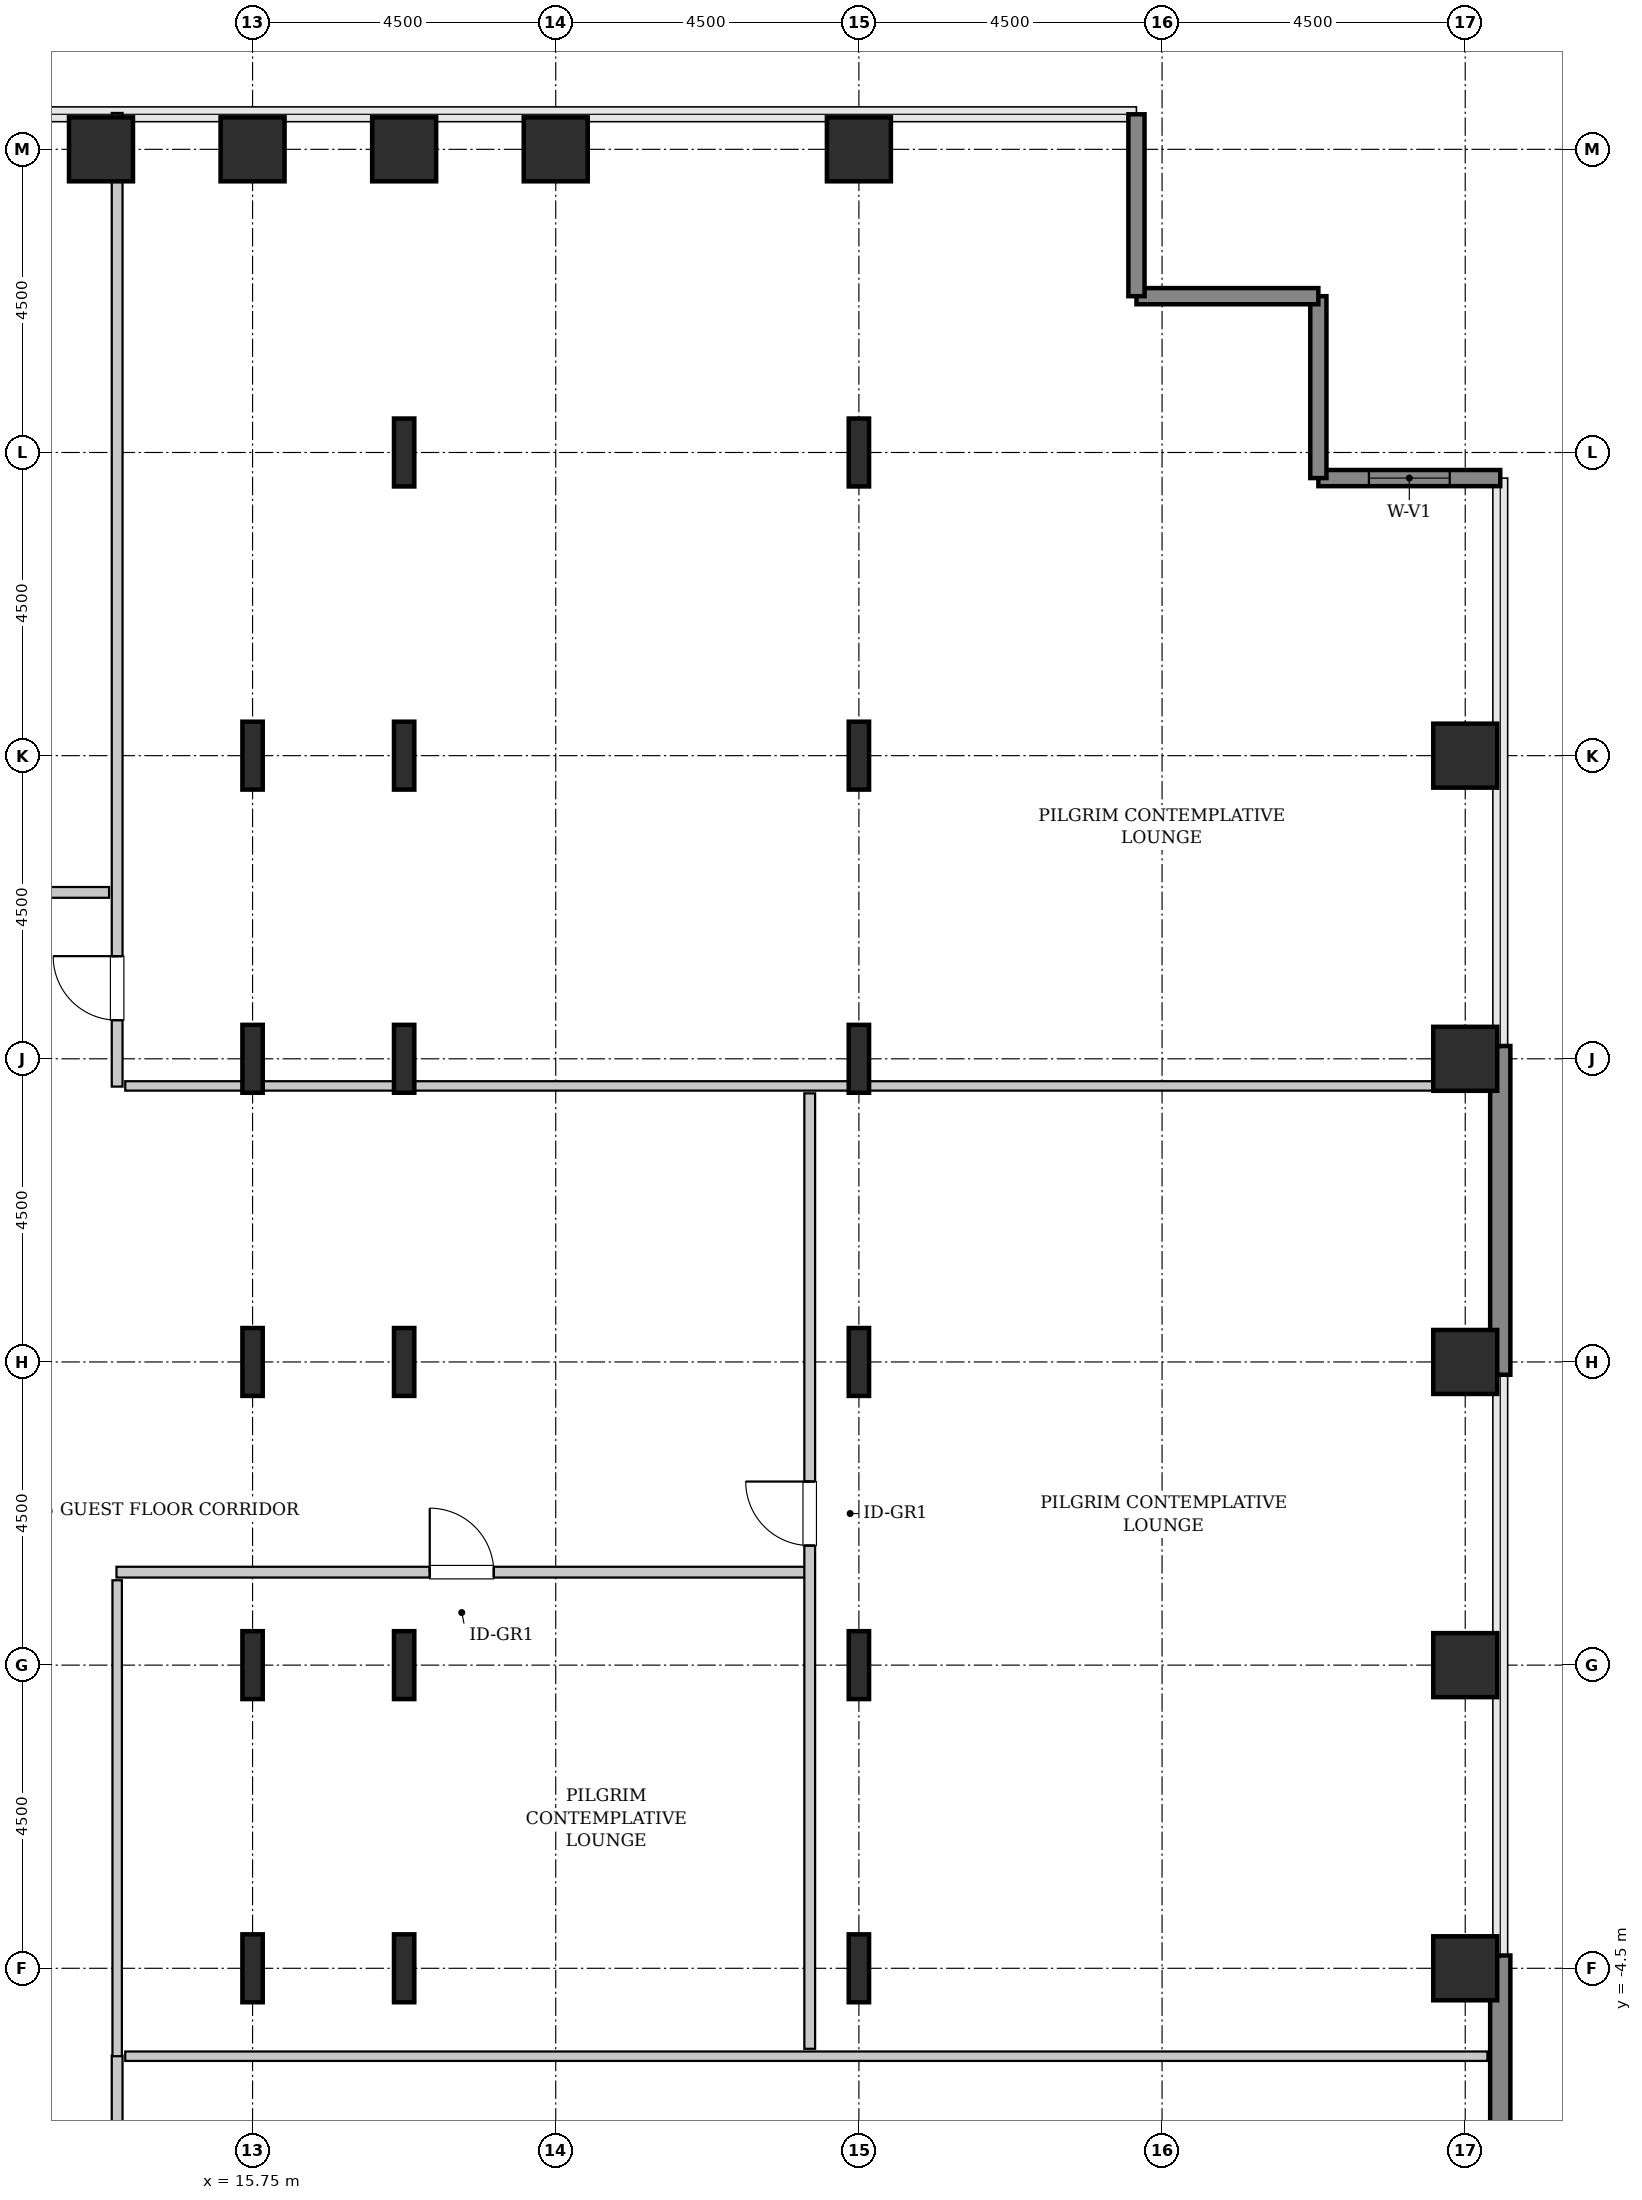
"""IFC4 building model, lengths in metres.
Left out: names, types, materials, properties, quantities, classifications, styles, units other than length and angle.
Written with IfcOpenShell. Run it as: python <this file> out.ifc"""

import sys

from ifc_helpers import new_model, si_unit, direction, frame, frame_2d, origin, origin_2d, place, context, subcontext, project, spatial, rectangle, hollow_rectangle, i_section, extrude, source, transform, mapped, element, fill, save


model = new_model("IFC4")
c1 = context("Model", 3, precision=1e-05, world=origin(), true_north=direction((0.0, 1.0)))
c2 = subcontext(c1, "Body", "Model", "MODEL_VIEW")
j1 = project(units=[si_unit("LENGTHUNIT", "METRE"), si_unit("PLANEANGLEUNIT", "RADIAN")], contexts=[c1])
p1 = place(None, origin())
s1 = spatial("IfcSite", under=j1, at=p1, CompositionType="ELEMENT")
p2 = place(p1, origin())
s2 = spatial("IfcBuilding", under=s1, at=p2, CompositionType="ELEMENT")
p3 = place(p2, frame((0.0, 0.0, 67.2)))
s3 = spatial("IfcBuildingStorey", under=s2, at=p3, CompositionType="ELEMENT", Elevation=67.2)
m1 = source(origin(), c2, "Body", "SweptSolid", [
    extrude(hollow_rectangle(XDim=0.95, YDim=0.95, WallThickness=0.045, InnerFilletRadius=0.045, OuterFilletRadius=0.09, at=origin_2d()), origin(), (0.0, 0.0, 1.0), 3.8),
])
p4 = place(p3, frame((13.5, 22.5, 0.0), z_axis=(0.0, 0.0, 1.0), x_axis=(1.0, 0.0, 0.0)))
e1 = element("IfcColumn", 1, at=p4, inside=s3, PredefinedType="COLUMN", context=c2, shape_type="MappedRepresentation", body=[
    mapped(m1, transform((0.0, 0.0, 0.0), x_axis=(1.0, 0.0, 0.0), y_axis=(0.0, 1.0, 0.0), z_axis=(0.0, 0.0, 1.0), scale=1.0)),
])
m2 = source(origin(), c2, "Body", "SweptSolid", [
    extrude(i_section(OverallWidth=0.302, OverallDepth=1.008, WebThickness=0.021, FlangeThickness=0.04, FilletRadius=0.03, at=origin_2d()), origin(), (0.0, 0.0, 1.0), 3.8),
])
for number, where, z_axis, x_axis in (
    (2, (15.75, -4.5, 0.0), (0.0, 0.0, 1.0), (1.0, 0.0, 0.0)),
    (3, (15.75, 0.0, 0.0), (0.0, 0.0, 1.0), (1.0, 0.0, 0.0)),
    (4, (15.75, 4.5, 0.0), (0.0, 0.0, 1.0), (1.0, 0.0, 0.0)),
    (5, (15.75, 9.0, 0.0), (0.0, 0.0, 1.0), (1.0, 0.0, 0.0)),
    (6, (15.75, 13.5, 0.0), (0.0, 0.0, 1.0), (1.0, 0.0, 0.0)),
):
    element("IfcColumn", number, at=place(p3, frame(where, z_axis=z_axis, x_axis=x_axis)), inside=s3, PredefinedType="COLUMN", context=c2, shape_type="MappedRepresentation", body=[
        mapped(m2, transform((0.0, 0.0, 0.0), x_axis=(1.0, 0.0, 0.0), y_axis=(0.0, 1.0, 0.0), z_axis=(0.0, 0.0, 1.0), scale=1.0)),
    ])
p5 = place(p3, frame((15.75, 22.5, 0.0), z_axis=(0.0, 0.0, 1.0), x_axis=(1.0, 0.0, 0.0)))
e7 = element("IfcColumn", 7, at=p5, inside=s3, PredefinedType="COLUMN", context=c2, shape_type="MappedRepresentation", body=[
    mapped(m1, transform((0.0, 0.0, 0.0), x_axis=(1.0, 0.0, 0.0), y_axis=(0.0, 1.0, 0.0), z_axis=(0.0, 0.0, 1.0), scale=1.0)),
])
for number, where, z_axis, x_axis in (
    (8, (18.0, -4.5, 0.0), (0.0, 0.0, 1.0), (1.0, 0.0, 0.0)),
    (9, (18.0, 0.0, 0.0), (0.0, 0.0, 1.0), (1.0, 0.0, 0.0)),
    (10, (18.0, 4.5, 0.0), (0.0, 0.0, 1.0), (1.0, 0.0, 0.0)),
    (11, (18.0, 9.0, 0.0), (0.0, 0.0, 1.0), (1.0, 0.0, 0.0)),
    (12, (18.0, 13.5, 0.0), (0.0, 0.0, 1.0), (1.0, 0.0, 0.0)),
    (13, (18.0, 18.0, 0.0), (0.0, 0.0, 1.0), (1.0, 0.0, 0.0)),
):
    element("IfcColumn", number, at=place(p3, frame(where, z_axis=z_axis, x_axis=x_axis)), inside=s3, PredefinedType="COLUMN", context=c2, shape_type="MappedRepresentation", body=[
        mapped(m2, transform((0.0, 0.0, 0.0), x_axis=(1.0, 0.0, 0.0), y_axis=(0.0, 1.0, 0.0), z_axis=(0.0, 0.0, 1.0), scale=1.0)),
    ])
for number, where, z_axis, x_axis in (
    (14, (18.0, 22.5, 0.0), (0.0, 0.0, 1.0), (1.0, 0.0, 0.0)),
    (15, (20.25, 22.5, 0.0), (0.0, 0.0, 1.0), (1.0, 0.0, 0.0)),
):
    element("IfcColumn", number, at=place(p3, frame(where, z_axis=z_axis, x_axis=x_axis)), inside=s3, PredefinedType="COLUMN", context=c2, shape_type="MappedRepresentation", body=[
        mapped(m1, transform((0.0, 0.0, 0.0), x_axis=(1.0, 0.0, 0.0), y_axis=(0.0, 1.0, 0.0), z_axis=(0.0, 0.0, 1.0), scale=1.0)),
    ])
for number, where, z_axis, x_axis in (
    (16, (24.75, -4.5, 0.0), (0.0, 0.0, 1.0), (1.0, 0.0, 0.0)),
    (17, (24.75, 0.0, 0.0), (0.0, 0.0, 1.0), (1.0, 0.0, 0.0)),
    (18, (24.75, 4.5, 0.0), (0.0, 0.0, 1.0), (1.0, 0.0, 0.0)),
    (19, (24.75, 9.0, 0.0), (0.0, 0.0, 1.0), (1.0, 0.0, 0.0)),
    (20, (24.75, 13.5, 0.0), (0.0, 0.0, 1.0), (1.0, 0.0, 0.0)),
    (21, (24.75, 18.0, 0.0), (0.0, 0.0, 1.0), (1.0, 0.0, 0.0)),
):
    element("IfcColumn", number, at=place(p3, frame(where, z_axis=z_axis, x_axis=x_axis)), inside=s3, PredefinedType="COLUMN", context=c2, shape_type="MappedRepresentation", body=[
        mapped(m2, transform((0.0, 0.0, 0.0), x_axis=(1.0, 0.0, 0.0), y_axis=(0.0, 1.0, 0.0), z_axis=(0.0, 0.0, 1.0), scale=1.0)),
    ])
for number, where, z_axis, x_axis in (
    (22, (24.75, 22.5, 0.0), (0.0, 0.0, 1.0), (1.0, 0.0, 0.0)),
    (23, (33.75, -4.5, 0.0), (0.0, 0.0, 1.0), (1.0, 0.0, 0.0)),
    (24, (33.75, 0.0, 0.0), (0.0, 0.0, 1.0), (1.0, 0.0, 0.0)),
    (25, (33.75, 4.5, 0.0), (0.0, 0.0, 1.0), (1.0, 0.0, 0.0)),
    (26, (33.75, 9.0, 0.0), (0.0, 0.0, 1.0), (1.0, 0.0, 0.0)),
    (27, (33.75, 13.5, 0.0), (0.0, 0.0, 1.0), (1.0, 0.0, 0.0)),
):
    element("IfcColumn", number, at=place(p3, frame(where, z_axis=z_axis, x_axis=x_axis)), inside=s3, PredefinedType="COLUMN", context=c2, shape_type="MappedRepresentation", body=[
        mapped(m1, transform((0.0, 0.0, 0.0), x_axis=(1.0, 0.0, 0.0), y_axis=(0.0, 1.0, 0.0), z_axis=(0.0, 0.0, 1.0), scale=1.0)),
    ])
m3 = source(origin(), c2, "Body", "SweptSolid", [
    extrude(rectangle(XDim=4.88, YDim=0.3, at=frame_2d((2.44, 0.0))), origin(), (0.0, 0.0, 1.0), 3.55),
])
for number, where, z_axis, x_axis in (
    (28, (34.27, -9.19, 0.0), (0.0, 0.0, 1.0), (0.0, 1.0, 0.0)),
    (29, (34.27, 4.31, 0.0), (0.0, 0.0, 1.0), (0.0, 1.0, 0.0)),
):
    element("IfcWall", number, at=place(p3, frame(where, z_axis=z_axis, x_axis=x_axis)), inside=s3, PredefinedType="SHEAR", context=c2, shape_type="MappedRepresentation", body=[
        mapped(m3, transform((0.0, 0.0, 0.0), x_axis=(1.0, 0.0, 0.0), y_axis=(0.0, 1.0, 0.0), z_axis=(0.0, 0.0, 1.0), scale=1.0)),
    ])
m4 = source(origin(), c2, "Body", "SweptSolid", [
    extrude(rectangle(XDim=2.7, YDim=0.24, at=frame_2d((1.35, 0.0))), origin(), (0.0, 0.0, 1.0), 3.55),
])
p6 = place(p3, frame((34.27, 17.62, 0.0), z_axis=(0.0, 0.0, 1.0), x_axis=(-1.0, 0.0, 0.0)))
e30 = element("IfcWall", 30, at=p6, inside=s3, PredefinedType="SHEAR", context=c2, shape_type="MappedRepresentation", body=[
    mapped(m4, transform((0.0, 0.0, 0.0), x_axis=(1.0, 0.0, 0.0), y_axis=(0.0, 1.0, 0.0), z_axis=(0.0, 0.0, 1.0), scale=1.0)),
])
p7 = place(p6, frame((0.75, 0.0, 0.85)))
e31 = element("IfcOpeningElement", 31, at=p7, cuts=e30, PredefinedType="OPENING", context=c2, shape_type="SweptSolid", body=[
    extrude(rectangle(XDim=1.2, YDim=1.8, at=frame_2d((0.6, 0.9))), frame((0.0, 0.13, 0.0), z_axis=(0.0, -1.0, 0.0), x_axis=(1.0, 0.0, 0.0)), (0.0, 0.0, 1.0), 0.26),
])
for number, where, z_axis, x_axis in (
    (32, (31.57, 17.62, 0.0), (0.0, 0.0, 1.0), (0.0, 1.0, 0.0)),
    (33, (31.57, 20.32, 0.0), (0.0, 0.0, 1.0), (-1.0, 0.0, 0.0)),
    (34, (28.87, 20.32, 0.0), (0.0, 0.0, 1.0), (0.0, 1.0, 0.0)),
):
    element("IfcWall", number, at=place(p3, frame(where, z_axis=z_axis, x_axis=x_axis)), inside=s3, PredefinedType="SHEAR", context=c2, shape_type="MappedRepresentation", body=[
        mapped(m4, transform((0.0, 0.0, 0.0), x_axis=(1.0, 0.0, 0.0), y_axis=(0.0, 1.0, 0.0), z_axis=(0.0, 0.0, 1.0), scale=1.0)),
    ])
m5 = source(origin(), c2, "Body", "SweptSolid", [
    extrude(rectangle(XDim=17.245, YDim=0.16, at=frame_2d((8.623, 0.0))), origin(), (0.0, 0.0, 1.0), 3.535),
])
p8 = place(p3, frame((13.74, -23.04, 0.0), z_axis=(0.0, 0.0, 1.0), x_axis=(0.0, 1.0, 0.0)))
e35 = element("IfcWall", 35, at=p8, inside=s3, PredefinedType="PARTITIONING", context=c2, shape_type="MappedRepresentation", body=[
    mapped(m5, transform((0.0, 0.0, 0.0), x_axis=(1.0, 0.0, 0.0), y_axis=(0.0, 1.0, 0.0), z_axis=(0.0, 0.0, 1.0), scale=1.0)),
])
p9 = place(p8, frame((13.913, 0.0, 0.0)))
e36 = element("IfcOpeningElement", 36, at=p9, cuts=e35, PredefinedType="OPENING", context=c2, shape_type="SweptSolid", body=[
    extrude(rectangle(XDim=0.95, YDim=2.1, at=frame_2d((0.475, 1.05))), frame((0.0, 0.09, 0.0), z_axis=(0.0, -1.0, 0.0), x_axis=(1.0, 0.0, 0.0)), (0.0, 0.0, 1.0), 0.18),
])
m6 = source(origin(), c2, "Body", "SweptSolid", [
    extrude(rectangle(XDim=20.22, YDim=0.14, at=frame_2d((10.11, 0.0))), origin(), (0.0, 0.0, 1.0), 3.535),
])
p10 = place(p3, frame((13.86, -5.805, 0.0), z_axis=(0.0, 0.0, 1.0), x_axis=(1.0, 0.0, 0.0)))
e37 = element("IfcWall", 37, at=p10, inside=s3, PredefinedType="PARTITIONING", context=c2, shape_type="MappedRepresentation", body=[
    mapped(m6, transform((0.0, 0.0, 0.0), x_axis=(1.0, 0.0, 0.0), y_axis=(0.0, 1.0, 0.0), z_axis=(0.0, 0.0, 1.0), scale=1.0)),
])
m7 = source(origin(), c2, "Body", "SweptSolid", [
    extrude(rectangle(XDim=14.453, YDim=0.16, at=frame_2d((7.226, 0.0))), origin(), (0.0, 0.0, 1.0), 3.535),
])
p11 = place(p3, frame((13.74, 8.587, 0.0), z_axis=(0.0, 0.0, 1.0), x_axis=(0.0, 1.0, 0.0)))
e38 = element("IfcWall", 38, at=p11, inside=s3, PredefinedType="PARTITIONING", context=c2, shape_type="MappedRepresentation", body=[
    mapped(m7, transform((0.0, 0.0, 0.0), x_axis=(1.0, 0.0, 0.0), y_axis=(0.0, 1.0, 0.0), z_axis=(0.0, 0.0, 1.0), scale=1.0)),
])
p12 = place(p11, frame((0.986, 0.0, 0.0)))
e39 = element("IfcOpeningElement", 39, at=p12, cuts=e38, PredefinedType="OPENING", context=c2, shape_type="SweptSolid", body=[
    extrude(rectangle(XDim=0.95, YDim=2.1, at=frame_2d((0.475, 1.05))), frame((0.0, 0.09, 0.0), z_axis=(0.0, -1.0, 0.0), x_axis=(1.0, 0.0, 0.0)), (0.0, 0.0, 1.0), 0.18),
])
m8 = source(origin(), c2, "Body", "SweptSolid", [
    extrude(rectangle(XDim=20.22, YDim=0.14, at=frame_2d((10.11, 0.0))), origin(), (0.0, 0.0, 1.0), 2.825),
])
p13 = place(p3, frame((13.86, 8.597, 0.0), z_axis=(0.0, 0.0, 1.0), x_axis=(1.0, 0.0, 0.0)))
e40 = element("IfcWall", 40, at=p13, inside=s3, PredefinedType="PARTITIONING", context=c2, shape_type="MappedRepresentation", body=[
    mapped(m8, transform((0.0, 0.0, 0.0), x_axis=(1.0, 0.0, 0.0), y_axis=(0.0, 1.0, 0.0), z_axis=(0.0, 0.0, 1.0), scale=1.0)),
])
m9 = source(origin(), c2, "Body", "SweptSolid", [
    extrude(rectangle(XDim=10.25, YDim=0.16, at=frame_2d((5.125, 0.0))), origin(), (0.0, 0.0, 1.0), 3.535),
])
p14 = place(p3, frame((13.73, 1.38, 0.0), z_axis=(0.0, 0.0, 1.0), x_axis=(1.0, 0.0, 0.0)))
e41 = element("IfcWall", 41, at=p14, inside=s3, PredefinedType="PARTITIONING", context=c2, shape_type="MappedRepresentation", body=[
    mapped(m9, transform((0.0, 0.0, 0.0), x_axis=(1.0, 0.0, 0.0), y_axis=(0.0, 1.0, 0.0), z_axis=(0.0, 0.0, 1.0), scale=1.0)),
])
p15 = place(p14, frame((4.65, 0.0, 0.0)))
e42 = element("IfcOpeningElement", 42, at=p15, cuts=e41, PredefinedType="OPENING", context=c2, shape_type="SweptSolid", body=[
    extrude(rectangle(XDim=0.95, YDim=2.1, at=frame_2d((0.475, 1.05))), frame((0.0, 0.09, 0.0), z_axis=(0.0, -1.0, 0.0), x_axis=(1.0, 0.0, 0.0)), (0.0, 0.0, 1.0), 0.18),
])
m10 = source(origin(), c2, "Body", "SweptSolid", [
    extrude(rectangle(XDim=7.065, YDim=0.14, at=frame_2d((3.532, 0.0))), origin(), (0.0, 0.0, 1.0), 3.535),
])
p16 = place(p3, frame((13.74, -5.805, 0.0), z_axis=(0.0, 0.0, 1.0), x_axis=(0.0, 1.0, 0.0)))
e43 = element("IfcWall", 43, at=p16, inside=s3, PredefinedType="PARTITIONING", context=c2, shape_type="MappedRepresentation", body=[
    mapped(m10, transform((0.0, 0.0, 0.0), x_axis=(1.0, 0.0, 0.0), y_axis=(0.0, 1.0, 0.0), z_axis=(0.0, 0.0, 1.0), scale=1.0)),
])
m11 = source(origin(), c2, "Body", "SweptSolid", [
    extrude(rectangle(XDim=14.183, YDim=0.16, at=frame_2d((7.091, 0.0))), origin(), (0.0, 0.0, 1.0), 3.535),
])
p17 = place(p3, frame((24.02, -5.695, 0.0), z_axis=(0.0, 0.0, 1.0), x_axis=(0.0, 1.0, 0.0)))
e44 = element("IfcWall", 44, at=p17, inside=s3, PredefinedType="PARTITIONING", context=c2, shape_type="MappedRepresentation", body=[
    mapped(m11, transform((0.0, 0.0, 0.0), x_axis=(1.0, 0.0, 0.0), y_axis=(0.0, 1.0, 0.0), z_axis=(0.0, 0.0, 1.0), scale=1.0)),
])
p18 = place(p17, frame((7.47, 0.0, 0.0)))
e45 = element("IfcOpeningElement", 45, at=p18, cuts=e44, PredefinedType="OPENING", context=c2, shape_type="SweptSolid", body=[
    extrude(rectangle(XDim=0.95, YDim=2.1, at=frame_2d((0.475, 1.05))), frame((0.0, 0.09, 0.0), z_axis=(0.0, -1.0, 0.0), x_axis=(1.0, 0.0, 0.0)), (0.0, 0.0, 1.0), 0.18),
])
m12 = source(origin(), c2, "Body", "SweptSolid", [
    extrude(rectangle(XDim=5.225, YDim=0.16, at=frame_2d((2.613, 0.0))), origin(), (0.0, 0.0, 1.0), 3.535),
])
p19 = place(p3, frame((8.395, 11.47, 0.0), z_axis=(0.0, 0.0, 1.0), x_axis=(1.0, 0.0, 0.0)))
e46 = element("IfcWall", 46, at=p19, inside=s3, PredefinedType="PARTITIONING", context=c2, shape_type="MappedRepresentation", body=[
    mapped(m12, transform((0.0, 0.0, 0.0), x_axis=(1.0, 0.0, 0.0), y_axis=(0.0, 1.0, 0.0), z_axis=(0.0, 0.0, 1.0), scale=1.0)),
])
p20 = place(p19, frame((2.137, 0.0, 0.0)))
e47 = element("IfcOpeningElement", 47, at=p20, cuts=e46, PredefinedType="OPENING", context=c2, shape_type="SweptSolid", body=[
    extrude(rectangle(XDim=0.95, YDim=2.1, at=frame_2d((0.475, 1.05))), frame((0.0, 0.09, 0.0), z_axis=(0.0, -1.0, 0.0), x_axis=(1.0, 0.0, 0.0)), (0.0, 0.0, 1.0), 0.18),
])
m13 = source(origin(), c2, "Body", "SweptSolid", [
    extrude(rectangle(XDim=1.2, YDim=1.8, at=frame_2d((0.6, 0.9))), frame((0.0, 0.03, 0.0), z_axis=(0.0, -1.0, 0.0), x_axis=(1.0, 0.0, 0.0)), (0.0, 0.0, 1.0), 0.06),
])
p21 = place(p7, origin())
e48 = element("IfcWindow", 48, at=p21, inside=s3, PartitioningType="SINGLE_PANEL", PredefinedType="WINDOW", context=c2, shape_type="MappedRepresentation", body=[
    mapped(m13, transform((0.0, 0.0, 0.0), x_axis=(1.0, 0.0, 0.0), y_axis=(0.0, 1.0, 0.0), z_axis=(0.0, 0.0, 1.0), scale=1.0)),
])
fill(e31, e48)
m14 = source(origin(), c2, "Body", "SweptSolid", [
    extrude(rectangle(XDim=0.95, YDim=2.1, at=frame_2d((0.475, 1.05))), frame((0.0, 0.025, 0.0), z_axis=(0.0, -1.0, 0.0), x_axis=(1.0, 0.0, 0.0)), (0.0, 0.0, 1.0), 0.05),
])
p22 = place(p12, origin())
e49 = element("IfcDoor", 49, at=p22, inside=s3, OperationType="SINGLE_SWING_RIGHT", PredefinedType="DOOR", context=c2, shape_type="MappedRepresentation", body=[
    mapped(m14, transform((0.0, 0.0, 0.0), x_axis=(1.0, 0.0, 0.0), y_axis=(0.0, 1.0, 0.0), z_axis=(0.0, 0.0, 1.0), scale=1.0)),
])
fill(e39, e49)
p23 = place(p15, origin())
e50 = element("IfcDoor", 50, at=p23, inside=s3, OperationType="SINGLE_SWING_LEFT", PredefinedType="DOOR", context=c2, shape_type="MappedRepresentation", body=[
    mapped(m14, transform((0.0, 0.0, 0.0), x_axis=(1.0, 0.0, 0.0), y_axis=(0.0, 1.0, 0.0), z_axis=(0.0, 0.0, 1.0), scale=1.0)),
])
fill(e42, e50)
p24 = place(p18, origin())
e51 = element("IfcDoor", 51, at=p24, inside=s3, OperationType="SINGLE_SWING_RIGHT", PredefinedType="DOOR", context=c2, shape_type="MappedRepresentation", body=[
    mapped(m14, transform((0.0, 0.0, 0.0), x_axis=(1.0, 0.0, 0.0), y_axis=(0.0, 1.0, 0.0), z_axis=(0.0, 0.0, 1.0), scale=1.0)),
])
fill(e45, e51)
save(model, sys.argv[1])
